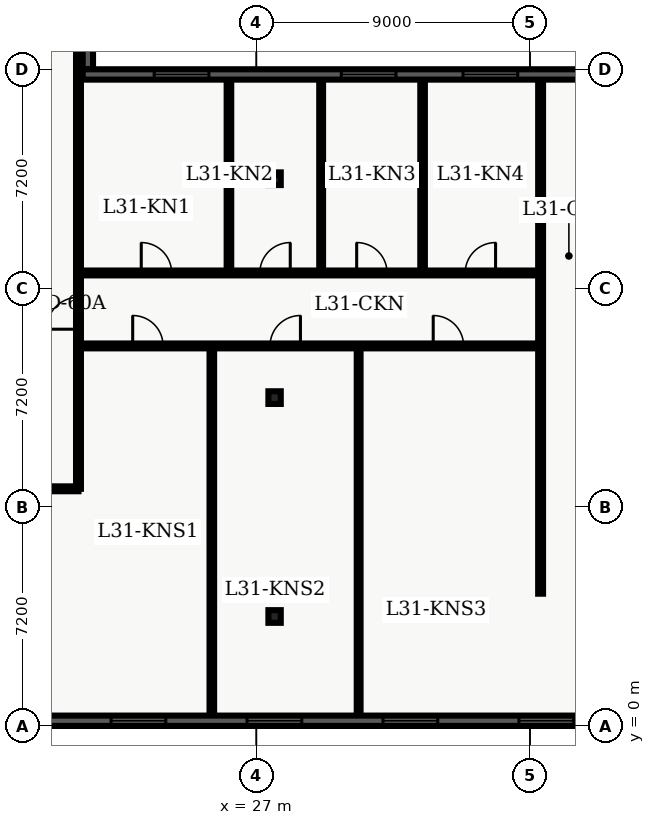
"""IFC4 building model, lengths in metres.
Left out: names, types, materials, properties, quantities, classifications, styles, units other than length and angle.
Written with IfcOpenShell. Run it as: python <this file> out.ifc"""

import sys

from ifc_helpers import new_model, entity, si_unit, converted_unit, direction, frame, origin_with_axes, origin_2d_with_axis, place, context, subcontext, project, spatial, polyline, rectangle, i_section, outline, extrude, element, fill, save


model = new_model("IFC4")
c1 = context("Model", 3, precision=1e-05, world=origin_with_axes(), true_north=direction((0.0, 1.0)))
c2 = subcontext(c1, "Body", "Model", "MODEL_VIEW")
j1 = project(units=[si_unit("LENGTHUNIT", "METRE"), converted_unit("PLANEANGLEUNIT", "DEGREE", entity("IfcPlaneAngleMeasure", 0.017), si_unit("PLANEANGLEUNIT", "RADIAN"), dimensions=[0, 0, 0, 0, 0, 0, 0])], contexts=[c1])
p1 = place(None, origin_with_axes())
s1 = spatial("IfcSite", under=j1, at=p1, CompositionType="ELEMENT")
p2 = place(p1, origin_with_axes())
s2 = spatial("IfcBuilding", under=s1, at=p2, CompositionType="ELEMENT")
p3 = place(p2, frame((0.0, 0.0, 129.0), z_axis=(0.0, 0.0, 1.0), x_axis=(1.0, 0.0, 0.0)))
s3 = spatial("IfcBuildingStorey", under=s2, at=p3, CompositionType="ELEMENT", Elevation=129.0)
for number, where, z_axis, x_axis in (
    (1, (27.6, 3.6, 0.0), (0.0, 0.0, 1.0), (1.0, 0.0, 0.0)),
    (2, (27.6, 10.8, 0.0), (0.0, 0.0, 1.0), (1.0, 0.0, 0.0)),
    (3, (27.6, 18.0, 0.0), (0.0, 0.0, 1.0), (1.0, 0.0, 0.0)),
):
    element("IfcColumn", number, at=place(p3, frame(where, z_axis=z_axis, x_axis=x_axis)), inside=s3, PredefinedType="COLUMN", context=c2, shape_type="SweptSolid", body=[
        extrude(i_section(OverallWidth=0.406, OverallDepth=0.416, WebThickness=0.03, FlangeThickness=0.048, FilletRadius=0.022, at=origin_2d_with_axis()), origin_with_axes(), (0.0, 0.0, 1.0), 3.9),
    ])
p4 = place(p3, frame((2.6, 7.8, 0.0), z_axis=(0.0, 0.0, 1.0), x_axis=(1.0, 0.0, 0.0)))
e4 = element("IfcWall", 4, at=p4, inside=s3, PredefinedType="PARTITIONING", context=c2, shape_type="SweptSolid", body=[
    extrude(outline(polyline([(0.0, -0.08), (18.55, -0.08), (18.55, 0.08), (0.0, 0.08), (0.0, -0.08)])), origin_with_axes(), (0.0, 0.0, 1.0), 2.7),
])
p5 = place(p4, frame((1.577, 0.0, 0.0), z_axis=(0.0, 0.0, 1.0), x_axis=(1.0, 0.0, 0.0)))
e5 = element("IfcOpeningElement", 5, at=p5, cuts=e4, PredefinedType="OPENING", context=c2, shape_type="SweptSolid", body=[
    extrude(rectangle(XDim=1.0, YDim=0.18, at=origin_2d_with_axis()), origin_with_axes(), (0.0, 0.0, 1.0), 2.15),
])
p6 = place(p4, frame((6.542, 0.0, 0.0), z_axis=(0.0, 0.0, 1.0), x_axis=(1.0, 0.0, 0.0)))
e6 = element("IfcOpeningElement", 6, at=p6, cuts=e4, PredefinedType="OPENING", context=c2, shape_type="SweptSolid", body=[
    extrude(rectangle(XDim=1.0, YDim=0.18, at=origin_2d_with_axis()), origin_with_axes(), (0.0, 0.0, 1.0), 2.15),
])
p7 = place(p4, frame((11.931, 0.0, 0.0), z_axis=(0.0, 0.0, 1.0), x_axis=(1.0, 0.0, 0.0)))
e7 = element("IfcOpeningElement", 7, at=p7, cuts=e4, PredefinedType="OPENING", context=c2, shape_type="SweptSolid", body=[
    extrude(rectangle(XDim=1.0, YDim=0.18, at=origin_2d_with_axis()), origin_with_axes(), (0.0, 0.0, 1.0), 2.15),
])
p8 = place(p4, frame((16.502, 0.0, 0.0), z_axis=(0.0, 0.0, 1.0), x_axis=(1.0, 0.0, 0.0)))
e8 = element("IfcOpeningElement", 8, at=p8, cuts=e4, PredefinedType="OPENING", context=c2, shape_type="SweptSolid", body=[
    extrude(rectangle(XDim=1.0, YDim=0.18, at=origin_2d_with_axis()), origin_with_axes(), (0.0, 0.0, 1.0), 2.15),
])
p9 = place(p3, frame((21.15, 7.8, 0.0), z_axis=(0.0, 0.0, 1.0), x_axis=(0.0, 1.0, 0.0)))
e9 = element("IfcWall", 9, at=p9, inside=s3, PredefinedType="PARTITIONING", context=c2, shape_type="SweptSolid", body=[
    extrude(outline(polyline([(0.0, -0.08), (32.7, -0.08), (32.7, 0.08), (0.0, 0.08), (0.0, -0.08)])), origin_with_axes(), (0.0, 0.0, 1.0), 2.7),
])
p10 = place(p9, frame((5.775, 0.0, 0.0), z_axis=(0.0, 0.0, 1.0), x_axis=(1.0, 0.0, 0.0)))
e10 = element("IfcOpeningElement", 10, at=p10, cuts=e9, PredefinedType="OPENING", context=c2, shape_type="SweptSolid", body=[
    extrude(rectangle(XDim=1.05, YDim=0.18, at=origin_2d_with_axis()), origin_with_axes(), (0.0, 0.0, 1.0), 2.15),
])
p11 = place(p3, frame((21.15, 12.5, 0.0), z_axis=(0.0, 0.0, 1.0), x_axis=(1.0, 0.0, 0.0)))
e11 = element("IfcWall", 11, at=p11, inside=s3, PredefinedType="PARTITIONING", context=c2, shape_type="SweptSolid", body=[
    extrude(outline(polyline([(0.0, -0.08), (15.2, -0.08), (15.2, 0.08), (0.0, 0.08), (0.0, -0.08)])), origin_with_axes(), (0.0, 0.0, 1.0), 2.7),
])
p12 = place(p11, frame((2.283, 0.0, 0.0), z_axis=(0.0, 0.0, 1.0), x_axis=(1.0, 0.0, 0.0)))
e12 = element("IfcOpeningElement", 12, at=p12, cuts=e11, PredefinedType="OPENING", context=c2, shape_type="SweptSolid", body=[
    extrude(rectangle(XDim=1.0, YDim=0.18, at=origin_2d_with_axis()), origin_with_axes(), (0.0, 0.0, 1.0), 2.15),
])
p13 = place(p11, frame((6.801, 0.0, 0.0), z_axis=(0.0, 0.0, 1.0), x_axis=(1.0, 0.0, 0.0)))
e13 = element("IfcOpeningElement", 13, at=p13, cuts=e11, PredefinedType="OPENING", context=c2, shape_type="SweptSolid", body=[
    extrude(rectangle(XDim=1.0, YDim=0.18, at=origin_2d_with_axis()), origin_with_axes(), (0.0, 0.0, 1.0), 2.15),
])
p14 = place(p11, frame((12.168, 0.0, 0.0), z_axis=(0.0, 0.0, 1.0), x_axis=(1.0, 0.0, 0.0)))
e14 = element("IfcOpeningElement", 14, at=p14, cuts=e11, PredefinedType="OPENING", context=c2, shape_type="SweptSolid", body=[
    extrude(rectangle(XDim=1.0, YDim=0.18, at=origin_2d_with_axis()), origin_with_axes(), (0.0, 0.0, 1.0), 2.15),
])
p15 = place(p3, frame((21.15, 14.9, 0.0), z_axis=(0.0, 0.0, 1.0), x_axis=(1.0, 0.0, 0.0)))
e15 = element("IfcWall", 15, at=p15, inside=s3, PredefinedType="PARTITIONING", context=c2, shape_type="SweptSolid", body=[
    extrude(outline(polyline([(0.0, -0.08), (15.2, -0.08), (15.2, 0.08), (0.0, 0.08), (0.0, -0.08)])), origin_with_axes(), (0.0, 0.0, 1.0), 2.7),
])
p16 = place(p15, frame((2.564, 0.0, 0.0), z_axis=(0.0, 0.0, 1.0), x_axis=(1.0, 0.0, 0.0)))
e16 = element("IfcOpeningElement", 16, at=p16, cuts=e15, PredefinedType="OPENING", context=c2, shape_type="SweptSolid", body=[
    extrude(rectangle(XDim=1.0, YDim=0.18, at=origin_2d_with_axis()), origin_with_axes(), (0.0, 0.0, 1.0), 2.15),
])
p17 = place(p15, frame((6.465, 0.0, 0.0), z_axis=(0.0, 0.0, 1.0), x_axis=(1.0, 0.0, 0.0)))
e17 = element("IfcOpeningElement", 17, at=p17, cuts=e15, PredefinedType="OPENING", context=c2, shape_type="SweptSolid", body=[
    extrude(rectangle(XDim=1.0, YDim=0.18, at=origin_2d_with_axis()), origin_with_axes(), (0.0, 0.0, 1.0), 2.15),
])
p18 = place(p15, frame((9.65, 0.0, 0.0), z_axis=(0.0, 0.0, 1.0), x_axis=(1.0, 0.0, 0.0)))
e18 = element("IfcOpeningElement", 18, at=p18, cuts=e15, PredefinedType="OPENING", context=c2, shape_type="SweptSolid", body=[
    extrude(rectangle(XDim=1.0, YDim=0.18, at=origin_2d_with_axis()), origin_with_axes(), (0.0, 0.0, 1.0), 2.15),
])
p19 = place(p15, frame((13.219, 0.0, 0.0), z_axis=(0.0, 0.0, 1.0), x_axis=(1.0, 0.0, 0.0)))
e19 = element("IfcOpeningElement", 19, at=p19, cuts=e15, PredefinedType="OPENING", context=c2, shape_type="SweptSolid", body=[
    extrude(rectangle(XDim=1.0, YDim=0.18, at=origin_2d_with_axis()), origin_with_axes(), (0.0, 0.0, 1.0), 2.15),
])
p20 = place(p3, frame((36.35, 4.35, 0.0), z_axis=(0.0, 0.0, 1.0), x_axis=(0.0, 1.0, 0.0)))
e20 = element("IfcWall", 20, at=p20, inside=s3, PredefinedType="PARTITIONING", context=c2, shape_type="SweptSolid", body=[
    extrude(outline(polyline([(0.0, -0.08), (16.95, -0.08), (16.95, 0.08), (0.0, 0.08), (0.0, -0.08)])), origin_with_axes(), (0.0, 0.0, 1.0), 2.7),
])
p21 = place(p3, frame((25.536, 0.335, 0.0), z_axis=(0.0, 0.0, 1.0), x_axis=(0.0, 1.0, 0.0)))
e21 = element("IfcWall", 21, at=p21, inside=s3, PredefinedType="PARTITIONING", context=c2, shape_type="SweptSolid", body=[
    extrude(outline(polyline([(0.0, -0.075), (12.045, -0.075), (12.045, 0.075), (0.0, 0.075), (0.0, -0.075)])), origin_with_axes(), (0.0, 0.0, 1.0), 2.7),
])
p22 = place(p3, frame((30.365, 0.335, 0.0), z_axis=(0.0, 0.0, 1.0), x_axis=(0.0, 1.0, 0.0)))
e22 = element("IfcWall", 22, at=p22, inside=s3, PredefinedType="PARTITIONING", context=c2, shape_type="SweptSolid", body=[
    extrude(outline(polyline([(0.0, -0.062), (12.045, -0.062), (12.045, 0.062), (0.0, 0.062), (0.0, -0.062)])), origin_with_axes(), (0.0, 0.0, 1.0), 2.7),
])
p23 = place(p3, frame((26.099, 15.02, 0.0), z_axis=(0.0, 0.0, 1.0), x_axis=(0.0, 1.0, 0.0)))
e23 = element("IfcWall", 23, at=p23, inside=s3, PredefinedType="PARTITIONING", context=c2, shape_type="SweptSolid", body=[
    extrude(outline(polyline([(0.0, -0.075), (6.245, -0.075), (6.245, 0.075), (0.0, 0.075), (0.0, -0.075)])), origin_with_axes(), (0.0, 0.0, 1.0), 2.7),
])
p24 = place(p3, frame((29.132, 15.02, 0.0), z_axis=(0.0, 0.0, 1.0), x_axis=(0.0, 1.0, 0.0)))
e24 = element("IfcWall", 24, at=p24, inside=s3, PredefinedType="PARTITIONING", context=c2, shape_type="SweptSolid", body=[
    extrude(outline(polyline([(0.0, -0.062), (6.245, -0.062), (6.245, 0.062), (0.0, 0.062), (0.0, -0.062)])), origin_with_axes(), (0.0, 0.0, 1.0), 2.7),
])
p25 = place(p3, frame((32.468, 15.02, 0.0), z_axis=(0.0, 0.0, 1.0), x_axis=(0.0, 1.0, 0.0)))
e25 = element("IfcWall", 25, at=p25, inside=s3, PredefinedType="PARTITIONING", context=c2, shape_type="SweptSolid", body=[
    extrude(outline(polyline([(0.0, -0.075), (6.245, -0.075), (6.245, 0.075), (0.0, 0.075), (0.0, -0.075)])), origin_with_axes(), (0.0, 0.0, 1.0), 2.7),
])
p26 = place(p3, frame((57.26, 0.17, 0.0), z_axis=(0.0, 0.0, 1.0), x_axis=(-1.0, 0.0, 0.0)))
e26 = element("IfcWall", 26, at=p26, inside=s3, PredefinedType="SOLIDWALL", context=c2, shape_type="SweptSolid", body=[
    extrude(outline(polyline([(0.0, -0.17), (54.86, -0.17), (54.86, 0.17), (0.0, 0.17), (0.0, -0.17)])), origin_with_axes(), (0.0, 0.0, 1.0), 3.66),
])
p27 = place(p26, frame((2.836, 0.0, 0.45), z_axis=(0.0, 0.0, 1.0), x_axis=(1.0, 0.0, 0.0)))
e27 = element("IfcOpeningElement", 27, at=p27, cuts=e26, PredefinedType="OPENING", context=c2, shape_type="SweptSolid", body=[
    extrude(rectangle(XDim=1.8, YDim=0.36, at=origin_2d_with_axis()), origin_with_axes(), (0.0, 0.0, 1.0), 2.1),
])
p28 = place(p26, frame((7.307, 0.0, 0.45), z_axis=(0.0, 0.0, 1.0), x_axis=(1.0, 0.0, 0.0)))
e28 = element("IfcOpeningElement", 28, at=p28, cuts=e26, PredefinedType="OPENING", context=c2, shape_type="SweptSolid", body=[
    extrude(rectangle(XDim=1.8, YDim=0.36, at=origin_2d_with_axis()), origin_with_axes(), (0.0, 0.0, 1.0), 2.1),
])
p29 = place(p26, frame((11.779, 0.0, 0.45), z_axis=(0.0, 0.0, 1.0), x_axis=(1.0, 0.0, 0.0)))
e29 = element("IfcOpeningElement", 29, at=p29, cuts=e26, PredefinedType="OPENING", context=c2, shape_type="SweptSolid", body=[
    extrude(rectangle(XDim=1.8, YDim=0.36, at=origin_2d_with_axis()), origin_with_axes(), (0.0, 0.0, 1.0), 2.1),
])
p30 = place(p26, frame((16.251, 0.0, 0.45), z_axis=(0.0, 0.0, 1.0), x_axis=(1.0, 0.0, 0.0)))
e30 = element("IfcOpeningElement", 30, at=p30, cuts=e26, PredefinedType="OPENING", context=c2, shape_type="SweptSolid", body=[
    extrude(rectangle(XDim=1.8, YDim=0.36, at=origin_2d_with_axis()), origin_with_axes(), (0.0, 0.0, 1.0), 2.1),
])
p31 = place(p26, frame((20.723, 0.0, 0.45), z_axis=(0.0, 0.0, 1.0), x_axis=(1.0, 0.0, 0.0)))
e31 = element("IfcOpeningElement", 31, at=p31, cuts=e26, PredefinedType="OPENING", context=c2, shape_type="SweptSolid", body=[
    extrude(rectangle(XDim=1.8, YDim=0.36, at=origin_2d_with_axis()), origin_with_axes(), (0.0, 0.0, 1.0), 2.1),
])
p32 = place(p26, frame((25.194, 0.0, 0.45), z_axis=(0.0, 0.0, 1.0), x_axis=(1.0, 0.0, 0.0)))
e32 = element("IfcOpeningElement", 32, at=p32, cuts=e26, PredefinedType="OPENING", context=c2, shape_type="SweptSolid", body=[
    extrude(rectangle(XDim=1.8, YDim=0.36, at=origin_2d_with_axis()), origin_with_axes(), (0.0, 0.0, 1.0), 2.1),
])
p33 = place(p26, frame((29.666, 0.0, 0.45), z_axis=(0.0, 0.0, 1.0), x_axis=(1.0, 0.0, 0.0)))
e33 = element("IfcOpeningElement", 33, at=p33, cuts=e26, PredefinedType="OPENING", context=c2, shape_type="SweptSolid", body=[
    extrude(rectangle(XDim=1.8, YDim=0.36, at=origin_2d_with_axis()), origin_with_axes(), (0.0, 0.0, 1.0), 2.1),
])
p34 = place(p26, frame((34.138, 0.0, 0.45), z_axis=(0.0, 0.0, 1.0), x_axis=(1.0, 0.0, 0.0)))
e34 = element("IfcOpeningElement", 34, at=p34, cuts=e26, PredefinedType="OPENING", context=c2, shape_type="SweptSolid", body=[
    extrude(rectangle(XDim=1.8, YDim=0.36, at=origin_2d_with_axis()), origin_with_axes(), (0.0, 0.0, 1.0), 2.1),
])
p35 = place(p26, frame((38.159, 0.0, 0.45), z_axis=(0.0, 0.0, 1.0), x_axis=(1.0, 0.0, 0.0)))
e35 = element("IfcOpeningElement", 35, at=p35, cuts=e26, PredefinedType="OPENING", context=c2, shape_type="SweptSolid", body=[
    extrude(rectangle(XDim=1.8, YDim=0.36, at=origin_2d_with_axis()), origin_with_axes(), (0.0, 0.0, 1.0), 2.1),
])
p36 = place(p26, frame((43.081, 0.0, 0.45), z_axis=(0.0, 0.0, 1.0), x_axis=(1.0, 0.0, 0.0)))
e36 = element("IfcOpeningElement", 36, at=p36, cuts=e26, PredefinedType="OPENING", context=c2, shape_type="SweptSolid", body=[
    extrude(rectangle(XDim=1.8, YDim=0.36, at=origin_2d_with_axis()), origin_with_axes(), (0.0, 0.0, 1.0), 2.1),
])
p37 = place(p26, frame((47.553, 0.0, 0.45), z_axis=(0.0, 0.0, 1.0), x_axis=(1.0, 0.0, 0.0)))
e37 = element("IfcOpeningElement", 37, at=p37, cuts=e26, PredefinedType="OPENING", context=c2, shape_type="SweptSolid", body=[
    extrude(rectangle(XDim=1.8, YDim=0.36, at=origin_2d_with_axis()), origin_with_axes(), (0.0, 0.0, 1.0), 2.1),
])
p38 = place(p26, frame((52.024, 0.0, 0.45), z_axis=(0.0, 0.0, 1.0), x_axis=(1.0, 0.0, 0.0)))
e38 = element("IfcOpeningElement", 38, at=p38, cuts=e26, PredefinedType="OPENING", context=c2, shape_type="SweptSolid", body=[
    extrude(rectangle(XDim=1.8, YDim=0.36, at=origin_2d_with_axis()), origin_with_axes(), (0.0, 0.0, 1.0), 2.1),
])
p39 = place(p3, frame((21.458, 46.82, 0.0), z_axis=(0.0, 0.0, 1.0), x_axis=(0.0, -1.0, 0.0)))
e39 = element("IfcWall", 39, at=p39, inside=s3, PredefinedType="SOLIDWALL", context=c2, shape_type="SweptSolid", body=[
    extrude(outline(polyline([(0.0, -0.17), (25.22, -0.17), (25.22, 0.17), (0.0, 0.17), (0.0, -0.17)])), origin_with_axes(), (0.0, 0.0, 1.0), 3.66),
])
p40 = place(p39, frame((3.002, 0.0, 0.45), z_axis=(0.0, 0.0, 1.0), x_axis=(1.0, 0.0, 0.0)))
e40 = element("IfcOpeningElement", 40, at=p40, cuts=e39, PredefinedType="OPENING", context=c2, shape_type="SweptSolid", body=[
    extrude(rectangle(XDim=1.6, YDim=0.36, at=origin_2d_with_axis()), origin_with_axes(), (0.0, 0.0, 1.0), 2.2),
])
p41 = place(p3, frame((21.288, 21.43, 0.0), z_axis=(0.0, 0.0, 1.0), x_axis=(1.0, 0.0, 0.0)))
e41 = element("IfcWall", 41, at=p41, inside=s3, PredefinedType="SOLIDWALL", context=c2, shape_type="SweptSolid", body=[
    extrude(outline(polyline([(0.0, -0.17), (17.112, -0.17), (17.112, 0.17), (0.0, 0.17), (0.0, -0.17)])), origin_with_axes(), (0.0, 0.0, 1.0), 3.66),
])
p42 = place(p41, frame((3.252, 0.0, 0.45), z_axis=(0.0, 0.0, 1.0), x_axis=(1.0, 0.0, 0.0)))
e42 = element("IfcOpeningElement", 42, at=p42, cuts=e41, PredefinedType="OPENING", context=c2, shape_type="SweptSolid", body=[
    extrude(rectangle(XDim=1.8, YDim=0.36, at=origin_2d_with_axis()), origin_with_axes(), (0.0, 0.0, 1.0), 2.1),
])
p43 = place(p41, frame((9.406, 0.0, 0.45), z_axis=(0.0, 0.0, 1.0), x_axis=(1.0, 0.0, 0.0)))
e43 = element("IfcOpeningElement", 43, at=p43, cuts=e41, PredefinedType="OPENING", context=c2, shape_type="SweptSolid", body=[
    extrude(rectangle(XDim=1.8, YDim=0.36, at=origin_2d_with_axis()), origin_with_axes(), (0.0, 0.0, 1.0), 2.1),
])
p44 = place(p41, frame((13.41, 0.0, 0.45), z_axis=(0.0, 0.0, 1.0), x_axis=(1.0, 0.0, 0.0)))
e44 = element("IfcOpeningElement", 44, at=p44, cuts=e41, PredefinedType="OPENING", context=c2, shape_type="SweptSolid", body=[
    extrude(rectangle(XDim=1.8, YDim=0.36, at=origin_2d_with_axis()), origin_with_axes(), (0.0, 0.0, 1.0), 2.1),
])
p45 = place(p9, frame((5.775, 0.0, 0.0), z_axis=(0.0, 0.0, 1.0), x_axis=(1.0, 0.0, 0.0)))
e45 = element("IfcDoor", 45, at=p45, inside=s3, OperationType="SINGLE_SWING_LEFT", PredefinedType="DOOR", context=c2, shape_type="SweptSolid", body=[
    extrude(rectangle(XDim=1.05, YDim=0.09, at=origin_2d_with_axis()), origin_with_axes(), (0.0, 0.0, 1.0), 2.15),
])
fill(e10, e45)
p46 = place(p11, frame((2.283, 0.0, 0.0), z_axis=(0.0, 0.0, 1.0), x_axis=(1.0, 0.0, 0.0)))
e46 = element("IfcDoor", 46, at=p46, inside=s3, OperationType="SINGLE_SWING_LEFT", PredefinedType="DOOR", context=c2, shape_type="SweptSolid", body=[
    extrude(rectangle(XDim=1.0, YDim=0.09, at=origin_2d_with_axis()), origin_with_axes(), (0.0, 0.0, 1.0), 2.15),
])
fill(e12, e46)
p47 = place(p11, frame((6.801, 0.0, 0.0), z_axis=(0.0, 0.0, 1.0), x_axis=(1.0, 0.0, 0.0)))
e47 = element("IfcDoor", 47, at=p47, inside=s3, OperationType="SINGLE_SWING_RIGHT", PredefinedType="DOOR", context=c2, shape_type="SweptSolid", body=[
    extrude(rectangle(XDim=1.0, YDim=0.09, at=origin_2d_with_axis()), origin_with_axes(), (0.0, 0.0, 1.0), 2.15),
])
fill(e13, e47)
p48 = place(p11, frame((12.168, 0.0, 0.0), z_axis=(0.0, 0.0, 1.0), x_axis=(1.0, 0.0, 0.0)))
e48 = element("IfcDoor", 48, at=p48, inside=s3, OperationType="SINGLE_SWING_LEFT", PredefinedType="DOOR", context=c2, shape_type="SweptSolid", body=[
    extrude(rectangle(XDim=1.0, YDim=0.09, at=origin_2d_with_axis()), origin_with_axes(), (0.0, 0.0, 1.0), 2.15),
])
fill(e14, e48)
p49 = place(p15, frame((2.564, 0.0, 0.0), z_axis=(0.0, 0.0, 1.0), x_axis=(1.0, 0.0, 0.0)))
e49 = element("IfcDoor", 49, at=p49, inside=s3, OperationType="SINGLE_SWING_LEFT", PredefinedType="DOOR", context=c2, shape_type="SweptSolid", body=[
    extrude(rectangle(XDim=1.0, YDim=0.09, at=origin_2d_with_axis()), origin_with_axes(), (0.0, 0.0, 1.0), 2.15),
])
fill(e16, e49)
p50 = place(p15, frame((6.465, 0.0, 0.0), z_axis=(0.0, 0.0, 1.0), x_axis=(1.0, 0.0, 0.0)))
e50 = element("IfcDoor", 50, at=p50, inside=s3, OperationType="SINGLE_SWING_RIGHT", PredefinedType="DOOR", context=c2, shape_type="SweptSolid", body=[
    extrude(rectangle(XDim=1.0, YDim=0.09, at=origin_2d_with_axis()), origin_with_axes(), (0.0, 0.0, 1.0), 2.15),
])
fill(e17, e50)
p51 = place(p15, frame((9.65, 0.0, 0.0), z_axis=(0.0, 0.0, 1.0), x_axis=(1.0, 0.0, 0.0)))
e51 = element("IfcDoor", 51, at=p51, inside=s3, OperationType="SINGLE_SWING_LEFT", PredefinedType="DOOR", context=c2, shape_type="SweptSolid", body=[
    extrude(rectangle(XDim=1.0, YDim=0.09, at=origin_2d_with_axis()), origin_with_axes(), (0.0, 0.0, 1.0), 2.15),
])
fill(e18, e51)
p52 = place(p15, frame((13.219, 0.0, 0.0), z_axis=(0.0, 0.0, 1.0), x_axis=(1.0, 0.0, 0.0)))
e52 = element("IfcDoor", 52, at=p52, inside=s3, OperationType="SINGLE_SWING_RIGHT", PredefinedType="DOOR", context=c2, shape_type="SweptSolid", body=[
    extrude(rectangle(XDim=1.0, YDim=0.09, at=origin_2d_with_axis()), origin_with_axes(), (0.0, 0.0, 1.0), 2.15),
])
fill(e19, e52)
p53 = place(p26, frame((20.723, 0.0, 0.45), z_axis=(0.0, 0.0, 1.0), x_axis=(1.0, 0.0, 0.0)))
e53 = element("IfcWindow", 53, at=p53, inside=s3, PredefinedType="WINDOW", context=c2, shape_type="SweptSolid", body=[
    extrude(rectangle(XDim=1.8, YDim=0.09, at=origin_2d_with_axis()), origin_with_axes(), (0.0, 0.0, 1.0), 2.1),
])
fill(e31, e53)
p54 = place(p26, frame((25.194, 0.0, 0.45), z_axis=(0.0, 0.0, 1.0), x_axis=(1.0, 0.0, 0.0)))
e54 = element("IfcWindow", 54, at=p54, inside=s3, PredefinedType="WINDOW", context=c2, shape_type="SweptSolid", body=[
    extrude(rectangle(XDim=1.8, YDim=0.09, at=origin_2d_with_axis()), origin_with_axes(), (0.0, 0.0, 1.0), 2.1),
])
fill(e32, e54)
p55 = place(p26, frame((29.666, 0.0, 0.45), z_axis=(0.0, 0.0, 1.0), x_axis=(1.0, 0.0, 0.0)))
e55 = element("IfcWindow", 55, at=p55, inside=s3, PredefinedType="WINDOW", context=c2, shape_type="SweptSolid", body=[
    extrude(rectangle(XDim=1.8, YDim=0.09, at=origin_2d_with_axis()), origin_with_axes(), (0.0, 0.0, 1.0), 2.1),
])
fill(e33, e55)
p56 = place(p26, frame((34.138, 0.0, 0.45), z_axis=(0.0, 0.0, 1.0), x_axis=(1.0, 0.0, 0.0)))
e56 = element("IfcWindow", 56, at=p56, inside=s3, PredefinedType="WINDOW", context=c2, shape_type="SweptSolid", body=[
    extrude(rectangle(XDim=1.8, YDim=0.09, at=origin_2d_with_axis()), origin_with_axes(), (0.0, 0.0, 1.0), 2.1),
])
fill(e34, e56)
p57 = place(p41, frame((3.252, 0.0, 0.45), z_axis=(0.0, 0.0, 1.0), x_axis=(1.0, 0.0, 0.0)))
e57 = element("IfcWindow", 57, at=p57, inside=s3, PredefinedType="WINDOW", context=c2, shape_type="SweptSolid", body=[
    extrude(rectangle(XDim=1.8, YDim=0.09, at=origin_2d_with_axis()), origin_with_axes(), (0.0, 0.0, 1.0), 2.1),
])
fill(e42, e57)
p58 = place(p41, frame((9.406, 0.0, 0.45), z_axis=(0.0, 0.0, 1.0), x_axis=(1.0, 0.0, 0.0)))
e58 = element("IfcWindow", 58, at=p58, inside=s3, PredefinedType="WINDOW", context=c2, shape_type="SweptSolid", body=[
    extrude(rectangle(XDim=1.8, YDim=0.09, at=origin_2d_with_axis()), origin_with_axes(), (0.0, 0.0, 1.0), 2.1),
])
fill(e43, e58)
p59 = place(p41, frame((13.41, 0.0, 0.45), z_axis=(0.0, 0.0, 1.0), x_axis=(1.0, 0.0, 0.0)))
e59 = element("IfcWindow", 59, at=p59, inside=s3, PredefinedType="WINDOW", context=c2, shape_type="SweptSolid", body=[
    extrude(rectangle(XDim=1.8, YDim=0.09, at=origin_2d_with_axis()), origin_with_axes(), (0.0, 0.0, 1.0), 2.1),
])
fill(e44, e59)
save(model, sys.argv[1])
